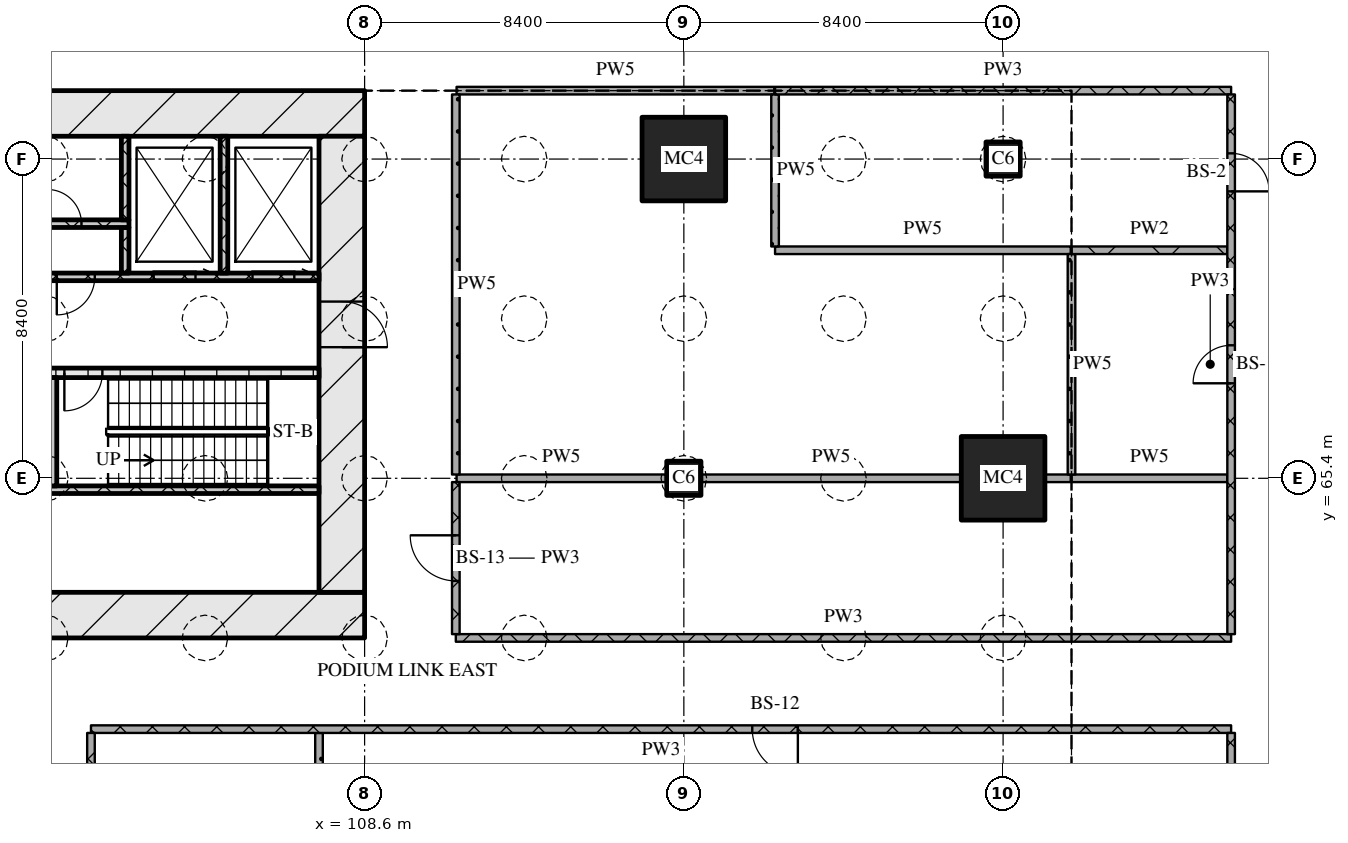
"""IFC4 building model, lengths in metres.
Left out: names, types, materials, properties, quantities, classifications, styles, units other than length and angle.
Written with IfcOpenShell. Run it as: python <this file> out.ifc"""

import sys

from ifc_helpers import new_model, si_unit, direction, frame, frame_2d, origin, origin_2d, place, context, subcontext, project, spatial, rectangle, extrude, element, fill, save


model = new_model("IFC4")
c1 = context("Model", 3, precision=1e-05, world=origin(), true_north=direction((0.0, 1.0)))
c2 = subcontext(c1, "Body", "Model", "MODEL_VIEW")
j1 = project(units=[si_unit("LENGTHUNIT", "METRE"), si_unit("PLANEANGLEUNIT", "RADIAN")], contexts=[c1])
p1 = place(None, origin())
s1 = spatial("IfcSite", under=j1, at=p1, CompositionType="ELEMENT")
p2 = place(p1, origin())
s2 = spatial("IfcBuilding", under=s1, at=p2, CompositionType="ELEMENT")
p3 = place(p2, frame((0.0, 0.0, -6.0)))
s3 = spatial("IfcBuildingStorey", under=s2, at=p3, CompositionType="ELEMENT", Elevation=-6.0)
p4 = place(p3, frame((117.0, 65.4, 0.0), z_axis=(0.0, 0.0, 1.0), x_axis=(1.0, 0.0, 0.0)))
e1 = element("IfcColumn", 1, at=p4, inside=s3, PredefinedType="COLUMN", context=c2, shape_type="SweptSolid", body=[
    extrude(rectangle(XDim=0.9, YDim=0.9, at=origin_2d()), origin(), (0.0, 0.0, 1.0), 6.0),
])
for number, where, z_axis, x_axis in (
    (2, (117.0, 73.8, 0.0), (0.0, 0.0, 1.0), (1.0, 0.0, 0.0)),
    (3, (125.4, 65.4, 0.0), (0.0, 0.0, 1.0), (1.0, 0.0, 0.0)),
):
    element("IfcColumn", number, at=place(p3, frame(where, z_axis=z_axis, x_axis=x_axis)), inside=s3, PredefinedType="COLUMN", context=c2, shape_type="SweptSolid", body=[
        extrude(rectangle(XDim=2.2, YDim=2.2, at=origin_2d()), origin(), (0.0, 0.0, 1.0), 6.0),
    ])
p5 = place(p3, frame((125.4, 73.8, 0.0), z_axis=(0.0, 0.0, 1.0), x_axis=(1.0, 0.0, 0.0)))
e4 = element("IfcColumn", 4, at=p5, inside=s3, PredefinedType="COLUMN", context=c2, shape_type="SweptSolid", body=[
    extrude(rectangle(XDim=0.9, YDim=0.9, at=origin_2d()), origin(), (0.0, 0.0, 1.0), 6.0),
])
p6 = place(p3, frame((66.6, 61.8, 0.0), z_axis=(0.0, 0.0, 1.0), x_axis=(1.0, 0.0, 0.0)))
e5 = element("IfcWall", 5, at=p6, inside=s3, PredefinedType="SOLIDWALL", context=c2, shape_type="SweptSolid", body=[
    extrude(rectangle(XDim=42.0, YDim=1.2, at=frame_2d((21.0, 0.0))), origin(), (0.0, 0.0, 1.0), 5.7),
])
p7 = place(p6, frame((21.35, 0.0, 0.0)))
e6 = element("IfcOpeningElement", 6, at=p7, cuts=e5, PredefinedType="OPENING", context=c2, shape_type="SweptSolid", body=[
    extrude(rectangle(XDim=1.8, YDim=2.1, at=frame_2d((0.9, 1.05))), frame((0.0, 0.61, 0.0), z_axis=(0.0, -1.0, 0.0), x_axis=(1.0, 0.0, 0.0)), (0.0, 0.0, 1.0), 1.22),
])
p8 = place(p3, frame((66.6, 75.0, 0.0), z_axis=(0.0, 0.0, 1.0), x_axis=(1.0, 0.0, 0.0)))
e7 = element("IfcWall", 7, at=p8, inside=s3, PredefinedType="SOLIDWALL", context=c2, shape_type="SweptSolid", body=[
    extrude(rectangle(XDim=42.0, YDim=1.2, at=frame_2d((21.0, 0.0))), origin(), (0.0, 0.0, 1.0), 5.7),
])
p9 = place(p3, frame((108.0, 62.4, 0.0), z_axis=(0.0, 0.0, 1.0), x_axis=(0.0, 1.0, 0.0)))
e8 = element("IfcWall", 8, at=p9, inside=s3, PredefinedType="SOLIDWALL", context=c2, shape_type="SweptSolid", body=[
    extrude(rectangle(XDim=12.0, YDim=1.2, at=frame_2d((6.0, 0.0))), origin(), (0.0, 0.0, 1.0), 5.7),
])
p10 = place(p9, frame((6.45, 0.0, 0.0)))
e9 = element("IfcOpeningElement", 9, at=p10, cuts=e8, PredefinedType="OPENING", context=c2, shape_type="SweptSolid", body=[
    extrude(rectangle(XDim=1.2, YDim=2.1, at=frame_2d((0.6, 1.05))), frame((0.0, 0.61, 0.0), z_axis=(0.0, -1.0, 0.0), x_axis=(1.0, 0.0, 0.0)), (0.0, 0.0, 1.0), 1.22),
])
p11 = place(p3, frame((91.4, 65.1, 0.0), z_axis=(0.0, 0.0, 1.0), x_axis=(1.0, 0.0, 0.0)))
e10 = element("IfcWall", 10, at=p11, inside=s3, PredefinedType="SOLIDWALL", context=c2, shape_type="SweptSolid", body=[
    extrude(rectangle(XDim=16.0, YDim=0.2, at=frame_2d((8.0, 0.0))), origin(), (0.0, 0.0, 1.0), 5.7),
])
p12 = place(p11, frame((7.83, 0.0, 0.0)))
e11 = element("IfcOpeningElement", 11, at=p12, cuts=e10, PredefinedType="OPENING", context=c2, shape_type="SweptSolid", body=[
    extrude(rectangle(XDim=0.9, YDim=2.1, at=frame_2d((0.45, 1.05))), frame((0.0, 0.11, 0.0), z_axis=(0.0, -1.0, 0.0), x_axis=(1.0, 0.0, 0.0)), (0.0, 0.0, 1.0), 0.22),
])
p13 = place(p3, frame((100.35, 65.2, 0.0), z_axis=(0.0, 0.0, 1.0), x_axis=(0.0, 1.0, 0.0)))
e12 = element("IfcWall", 12, at=p13, inside=s3, PredefinedType="SOLIDWALL", context=c2, shape_type="SweptSolid", body=[
    extrude(rectangle(XDim=2.85, YDim=0.3, at=frame_2d((1.425, 0.0))), origin(), (0.0, 0.0, 1.0), 5.7),
])
p14 = place(p3, frame((98.95, 68.175, 0.0), z_axis=(0.0, 0.0, 1.0), x_axis=(1.0, 0.0, 0.0)))
e13 = element("IfcWall", 13, at=p14, inside=s3, PredefinedType="SOLIDWALL", context=c2, shape_type="SweptSolid", body=[
    extrude(rectangle(XDim=8.45, YDim=0.25, at=frame_2d((4.225, 0.0))), origin(), (0.0, 0.0, 1.0), 5.7),
])
p15 = place(p14, frame((0.45, 0.0, 0.0)))
e14 = element("IfcOpeningElement", 14, at=p15, cuts=e13, PredefinedType="OPENING", context=c2, shape_type="SweptSolid", body=[
    extrude(rectangle(XDim=0.8, YDim=2.1, at=frame_2d((0.4, 1.05))), frame((0.0, 0.135, 0.0), z_axis=(0.0, -1.0, 0.0), x_axis=(1.0, 0.0, 0.0)), (0.0, 0.0, 1.0), 0.27),
])
p16 = place(p14, frame((1.75, 0.0, 0.0)))
e15 = element("IfcOpeningElement", 15, at=p16, cuts=e13, PredefinedType="OPENING", context=c2, shape_type="SweptSolid", body=[
    extrude(rectangle(XDim=1.0, YDim=2.1, at=frame_2d((0.5, 1.05))), frame((0.0, 0.135, 0.0), z_axis=(0.0, -1.0, 0.0), x_axis=(1.0, 0.0, 0.0)), (0.0, 0.0, 1.0), 0.27),
])
p17 = place(p3, frame((67.8, 70.7, 0.0), z_axis=(0.0, 0.0, 1.0), x_axis=(1.0, 0.0, 0.0)))
e16 = element("IfcWall", 16, at=p17, inside=s3, PredefinedType="SOLIDWALL", context=c2, shape_type="SweptSolid", body=[
    extrude(rectangle(XDim=39.6, YDim=0.2, at=frame_2d((19.8, 0.0))), origin(), (0.0, 0.0, 1.0), 5.7),
])
p18 = place(p17, frame((0.65, 0.0, 0.0)))
e17 = element("IfcOpeningElement", 17, at=p18, cuts=e16, PredefinedType="OPENING", context=c2, shape_type="SweptSolid", body=[
    extrude(rectangle(XDim=1.1, YDim=2.1, at=frame_2d((0.55, 1.05))), frame((0.0, 0.11, 0.0), z_axis=(0.0, -1.0, 0.0), x_axis=(1.0, 0.0, 0.0)), (0.0, 0.0, 1.0), 0.22),
])
p19 = place(p17, frame((3.25, 0.0, 0.0)))
e18 = element("IfcOpeningElement", 18, at=p19, cuts=e16, PredefinedType="OPENING", context=c2, shape_type="SweptSolid", body=[
    extrude(rectangle(XDim=1.1, YDim=2.1, at=frame_2d((0.55, 1.05))), frame((0.0, 0.11, 0.0), z_axis=(0.0, -1.0, 0.0), x_axis=(1.0, 0.0, 0.0)), (0.0, 0.0, 1.0), 0.22),
])
p20 = place(p17, frame((5.9, 0.0, 0.0)))
e19 = element("IfcOpeningElement", 19, at=p20, cuts=e16, PredefinedType="OPENING", context=c2, shape_type="SweptSolid", body=[
    extrude(rectangle(XDim=1.0, YDim=2.1, at=frame_2d((0.5, 1.05))), frame((0.0, 0.11, 0.0), z_axis=(0.0, -1.0, 0.0), x_axis=(1.0, 0.0, 0.0)), (0.0, 0.0, 1.0), 0.22),
])
p21 = place(p17, frame((21.7, 0.0, 0.0)))
e20 = element("IfcOpeningElement", 20, at=p21, cuts=e16, PredefinedType="OPENING", context=c2, shape_type="SweptSolid", body=[
    extrude(rectangle(XDim=1.0, YDim=2.1, at=frame_2d((0.5, 1.05))), frame((0.0, 0.11, 0.0), z_axis=(0.0, -1.0, 0.0), x_axis=(1.0, 0.0, 0.0)), (0.0, 0.0, 1.0), 0.22),
])
p22 = place(p17, frame((32.7, 0.0, 0.0)))
e21 = element("IfcOpeningElement", 21, at=p22, cuts=e16, PredefinedType="OPENING", context=c2, shape_type="SweptSolid", body=[
    extrude(rectangle(XDim=1.0, YDim=2.1, at=frame_2d((0.5, 1.05))), frame((0.0, 0.11, 0.0), z_axis=(0.0, -1.0, 0.0), x_axis=(1.0, 0.0, 0.0)), (0.0, 0.0, 1.0), 0.22),
])
p23 = place(p17, frame((35.25, 0.0, 0.0)))
e22 = element("IfcOpeningElement", 22, at=p23, cuts=e16, PredefinedType="OPENING", context=c2, shape_type="SweptSolid", body=[
    extrude(rectangle(XDim=1.1, YDim=2.1, at=frame_2d((0.55, 1.05))), frame((0.0, 0.11, 0.0), z_axis=(0.0, -1.0, 0.0), x_axis=(1.0, 0.0, 0.0)), (0.0, 0.0, 1.0), 0.22),
])
p24 = place(p17, frame((37.85, 0.0, 0.0)))
e23 = element("IfcOpeningElement", 23, at=p24, cuts=e16, PredefinedType="OPENING", context=c2, shape_type="SweptSolid", body=[
    extrude(rectangle(XDim=1.1, YDim=2.1, at=frame_2d((0.55, 1.05))), frame((0.0, 0.11, 0.0), z_axis=(0.0, -1.0, 0.0), x_axis=(1.0, 0.0, 0.0)), (0.0, 0.0, 1.0), 0.22),
])
p25 = place(p3, frame((102.3, 70.8, 0.0), z_axis=(0.0, 0.0, 1.0), x_axis=(0.0, 1.0, 0.0)))
e24 = element("IfcWall", 24, at=p25, inside=s3, PredefinedType="SOLIDWALL", context=c2, shape_type="SweptSolid", body=[
    extrude(rectangle(XDim=1.2, YDim=0.2, at=frame_2d((0.6, 0.0))), origin(), (0.0, 0.0, 1.0), 5.7),
])
p26 = place(p3, frame((104.9, 70.8, 0.0), z_axis=(0.0, 0.0, 1.0), x_axis=(0.0, 1.0, 0.0)))
e25 = element("IfcWall", 25, at=p26, inside=s3, PredefinedType="SOLIDWALL", context=c2, shape_type="SweptSolid", body=[
    extrude(rectangle(XDim=3.6, YDim=0.2, at=frame_2d((1.8, 0.0))), origin(), (0.0, 0.0, 1.0), 5.7),
])
p27 = place(p3, frame((90.7, 72.1, 0.0), z_axis=(0.0, 0.0, 1.0), x_axis=(1.0, 0.0, 0.0)))
e26 = element("IfcWall", 26, at=p27, inside=s3, PredefinedType="SOLIDWALL", context=c2, shape_type="SweptSolid", body=[
    extrude(rectangle(XDim=11.7, YDim=0.2, at=frame_2d((5.85, 0.0))), origin(), (0.0, 0.0, 1.0), 5.7),
])
p28 = place(p27, frame((4.175, 0.0, 0.0)))
e27 = element("IfcOpeningElement", 27, at=p28, cuts=e26, PredefinedType="OPENING", context=c2, shape_type="SweptSolid", body=[
    extrude(rectangle(XDim=0.9, YDim=2.1, at=frame_2d((0.45, 1.05))), frame((0.0, 0.11, 0.0), z_axis=(0.0, -1.0, 0.0), x_axis=(1.0, 0.0, 0.0)), (0.0, 0.0, 1.0), 0.22),
])
p29 = place(p27, frame((9.55, 0.0, 0.0)))
e28 = element("IfcOpeningElement", 28, at=p29, cuts=e26, PredefinedType="OPENING", context=c2, shape_type="SweptSolid", body=[
    extrude(rectangle(XDim=0.9, YDim=2.1, at=frame_2d((0.45, 1.05))), frame((0.0, 0.11, 0.0), z_axis=(0.0, -1.0, 0.0), x_axis=(1.0, 0.0, 0.0)), (0.0, 0.0, 1.0), 0.22),
])
p30 = place(p3, frame((102.3, 72.2, 0.0), z_axis=(0.0, 0.0, 1.0), x_axis=(0.0, 1.0, 0.0)))
e29 = element("IfcWall", 29, at=p30, inside=s3, PredefinedType="SOLIDWALL", context=c2, shape_type="SweptSolid", body=[
    extrude(rectangle(XDim=2.2, YDim=0.2, at=frame_2d((1.1, 0.0))), origin(), (0.0, 0.0, 1.0), 5.7),
])
p31 = place(p3, frame((131.4, 58.8, 0.0), z_axis=(0.0, 0.0, 1.0), x_axis=(-1.0, 0.0, 0.0)))
e30 = element("IfcWall", 30, at=p31, inside=s3, PredefinedType="PARTITIONING", context=c2, shape_type="SweptSolid", body=[
    extrude(rectangle(XDim=30.0, YDim=0.2, at=frame_2d((15.0, 0.0))), origin(), (0.0, 0.0, 1.0), 5.7),
])
p32 = place(p31, frame((11.4, 0.0, 0.0)))
e31 = element("IfcOpeningElement", 31, at=p32, cuts=e30, PredefinedType="OPENING", context=c2, shape_type="SweptSolid", body=[
    extrude(rectangle(XDim=1.2, YDim=2.1, at=frame_2d((0.6, 1.05))), frame((0.0, 0.11, 0.0), z_axis=(0.0, -1.0, 0.0), x_axis=(1.0, 0.0, 0.0)), (0.0, 0.0, 1.0), 0.22),
])
p33 = place(p3, frame((111.0, 61.2, 0.0), z_axis=(0.0, 0.0, 1.0), x_axis=(1.0, 0.0, 0.0)))
e32 = element("IfcWall", 32, at=p33, inside=s3, PredefinedType="PARTITIONING", context=c2, shape_type="SweptSolid", body=[
    extrude(rectangle(XDim=20.4, YDim=0.2, at=frame_2d((10.2, 0.0))), origin(), (0.0, 0.0, 1.0), 5.7),
])
p34 = place(p3, frame((111.02, 65.4, 0.0), z_axis=(0.0, 0.0, 1.0), x_axis=(1.0, 0.0, 0.0)))
e33 = element("IfcWall", 33, at=p34, inside=s3, PredefinedType="PARTITIONING", context=c2, shape_type="SweptSolid", body=[
    extrude(rectangle(XDim=5.51, YDim=0.2, at=frame_2d((2.755, 0.0))), origin(), (0.0, 0.0, 1.0), 5.1),
])
p35 = place(p3, frame((117.47, 65.4, 0.0), z_axis=(0.0, 0.0, 1.0), x_axis=(1.0, 0.0, 0.0)))
e34 = element("IfcWall", 34, at=p35, inside=s3, PredefinedType="PARTITIONING", context=c2, shape_type="SweptSolid", body=[
    extrude(rectangle(XDim=6.81, YDim=0.2, at=frame_2d((3.405, 0.0))), origin(), (0.0, 0.0, 1.0), 5.7),
])
p36 = place(p3, frame((126.52, 65.4, 0.0), z_axis=(0.0, 0.0, 1.0), x_axis=(1.0, 0.0, 0.0)))
e35 = element("IfcWall", 35, at=p36, inside=s3, PredefinedType="PARTITIONING", context=c2, shape_type="SweptSolid", body=[
    extrude(rectangle(XDim=0.66, YDim=0.2, at=frame_2d((0.33, 0.0))), origin(), (0.0, 0.0, 1.0), 4.71),
])
p37 = place(p3, frame((127.2, 65.4, 0.0), z_axis=(0.0, 0.0, 1.0), x_axis=(1.0, 0.0, 0.0)))
e36 = element("IfcWall", 36, at=p37, inside=s3, PredefinedType="PARTITIONING", context=c2, shape_type="SweptSolid", body=[
    extrude(rectangle(XDim=4.1, YDim=0.2, at=frame_2d((2.05, 0.0))), origin(), (0.0, 0.0, 1.0), 4.71),
])
p38 = place(p3, frame((127.2, 71.4, 0.0), z_axis=(0.0, 0.0, 1.0), x_axis=(1.0, 0.0, 0.0)))
e37 = element("IfcWall", 37, at=p38, inside=s3, PredefinedType="PARTITIONING", context=c2, shape_type="SweptSolid", body=[
    extrude(rectangle(XDim=4.1, YDim=0.2, at=frame_2d((2.05, 0.0))), origin(), (0.0, 0.0, 1.0), 5.7),
])
p39 = place(p3, frame((119.4, 71.4, 0.0), z_axis=(0.0, 0.0, 1.0), x_axis=(1.0, 0.0, 0.0)))
e38 = element("IfcWall", 38, at=p39, inside=s3, PredefinedType="PARTITIONING", context=c2, shape_type="SweptSolid", body=[
    extrude(rectangle(XDim=7.78, YDim=0.2, at=frame_2d((3.89, 0.0))), origin(), (0.0, 0.0, 1.0), 5.7),
])
p40 = place(p3, frame((119.4, 75.6, 0.0), z_axis=(0.0, 0.0, 1.0), x_axis=(1.0, 0.0, 0.0)))
e39 = element("IfcWall", 39, at=p40, inside=s3, PredefinedType="PARTITIONING", context=c2, shape_type="SweptSolid", body=[
    extrude(rectangle(XDim=12.0, YDim=0.2, at=frame_2d((6.0, 0.0))), origin(), (0.0, 0.0, 1.0), 5.7),
])
p41 = place(p3, frame((111.02, 75.6, 0.0), z_axis=(0.0, 0.0, 1.0), x_axis=(1.0, 0.0, 0.0)))
e40 = element("IfcWall", 40, at=p41, inside=s3, PredefinedType="PARTITIONING", context=c2, shape_type="SweptSolid", body=[
    extrude(rectangle(XDim=8.36, YDim=0.2, at=frame_2d((4.18, 0.0))), origin(), (0.0, 0.0, 1.0), 5.7),
])
p42 = place(p3, frame((101.4, 58.7, 0.0), z_axis=(0.0, 0.0, 1.0), x_axis=(0.0, -1.0, 0.0)))
e41 = element("IfcWall", 41, at=p42, inside=s3, PredefinedType="PARTITIONING", context=c2, shape_type="SweptSolid", body=[
    extrude(rectangle(XDim=8.0, YDim=0.2, at=frame_2d((4.0, 0.0))), origin(), (0.0, 0.0, 1.0), 5.7),
])
p43 = place(p42, frame((3.5, 0.0, 0.0)))
e42 = element("IfcOpeningElement", 42, at=p43, cuts=e41, PredefinedType="OPENING", context=c2, shape_type="SweptSolid", body=[
    extrude(rectangle(XDim=1.0, YDim=2.1, at=frame_2d((0.5, 1.05))), frame((0.0, 0.11, 0.0), z_axis=(0.0, -1.0, 0.0), x_axis=(1.0, 0.0, 0.0)), (0.0, 0.0, 1.0), 0.22),
])
p44 = place(p3, frame((107.4, 58.7, 0.0), z_axis=(0.0, 0.0, 1.0), x_axis=(0.0, -1.0, 0.0)))
e43 = element("IfcWall", 43, at=p44, inside=s3, PredefinedType="PARTITIONING", context=c2, shape_type="SweptSolid", body=[
    extrude(rectangle(XDim=7.9, YDim=0.2, at=frame_2d((3.95, 0.0))), origin(), (0.0, 0.0, 1.0), 5.7),
])
p45 = place(p3, frame((111.0, 65.3, 0.0), z_axis=(0.0, 0.0, 1.0), x_axis=(0.0, -1.0, 0.0)))
e44 = element("IfcWall", 44, at=p45, inside=s3, PredefinedType="PARTITIONING", context=c2, shape_type="SweptSolid", body=[
    extrude(rectangle(XDim=4.0, YDim=0.2, at=frame_2d((2.0, 0.0))), origin(), (0.0, 0.0, 1.0), 5.7),
])
p46 = place(p45, frame((1.4, 0.0, 0.0)))
e45 = element("IfcOpeningElement", 45, at=p46, cuts=e44, PredefinedType="OPENING", context=c2, shape_type="SweptSolid", body=[
    extrude(rectangle(XDim=1.2, YDim=2.1, at=frame_2d((0.6, 1.05))), frame((0.0, 0.11, 0.0), z_axis=(0.0, -1.0, 0.0), x_axis=(1.0, 0.0, 0.0)), (0.0, 0.0, 1.0), 0.22),
])
p47 = place(p3, frame((111.0, 75.5, 0.0), z_axis=(0.0, 0.0, 1.0), x_axis=(0.0, -1.0, 0.0)))
e46 = element("IfcWall", 46, at=p47, inside=s3, PredefinedType="PARTITIONING", context=c2, shape_type="SweptSolid", body=[
    extrude(rectangle(XDim=10.0, YDim=0.2, at=frame_2d((5.0, 0.0))), origin(), (0.0, 0.0, 1.0), 5.7),
])
p48 = place(p3, frame((119.4, 75.5, 0.0), z_axis=(0.0, 0.0, 1.0), x_axis=(0.0, -1.0, 0.0)))
e47 = element("IfcWall", 47, at=p48, inside=s3, PredefinedType="PARTITIONING", context=c2, shape_type="SweptSolid", body=[
    extrude(rectangle(XDim=4.0, YDim=0.2, at=frame_2d((2.0, 0.0))), origin(), (0.0, 0.0, 1.0), 5.7),
])
p49 = place(p3, frame((127.2, 71.3, 0.0), z_axis=(0.0, 0.0, 1.0), x_axis=(0.0, -1.0, 0.0)))
e48 = element("IfcWall", 48, at=p49, inside=s3, PredefinedType="PARTITIONING", context=c2, shape_type="SweptSolid", body=[
    extrude(rectangle(XDim=5.8, YDim=0.2, at=frame_2d((2.9, 0.0))), origin(), (0.0, 0.0, 1.0), 5.7),
])
p50 = place(p3, frame((131.4, 58.7, 0.0), z_axis=(0.0, 0.0, 1.0), x_axis=(0.0, -1.0, 0.0)))
e49 = element("IfcWall", 49, at=p50, inside=s3, PredefinedType="PARTITIONING", context=c2, shape_type="SweptSolid", body=[
    extrude(rectangle(XDim=24.4, YDim=0.2, at=frame_2d((12.2, 0.0))), origin(), (0.0, 0.0, 1.0), 5.2),
])
p51 = place(p3, frame((131.4, 61.3, 0.0), z_axis=(0.0, 0.0, 1.0), x_axis=(0.0, 1.0, 0.0)))
e50 = element("IfcWall", 50, at=p51, inside=s3, PredefinedType="PARTITIONING", context=c2, shape_type="SweptSolid", body=[
    extrude(rectangle(XDim=14.2, YDim=0.2, at=frame_2d((7.1, 0.0))), origin(), (0.0, 0.0, 1.0), 4.8),
])
p52 = place(p51, frame((6.6, 0.0, 0.0)))
e51 = element("IfcOpeningElement", 51, at=p52, cuts=e50, PredefinedType="OPENING", context=c2, shape_type="SweptSolid", body=[
    extrude(rectangle(XDim=1.0, YDim=2.1, at=frame_2d((0.5, 1.05))), frame((0.0, 0.11, 0.0), z_axis=(0.0, -1.0, 0.0), x_axis=(1.0, 0.0, 0.0)), (0.0, 0.0, 1.0), 0.22),
])
p53 = place(p51, frame((11.65, 0.0, 0.0)))
e52 = element("IfcOpeningElement", 52, at=p53, cuts=e50, PredefinedType="OPENING", context=c2, shape_type="SweptSolid", body=[
    extrude(rectangle(XDim=1.0, YDim=2.1, at=frame_2d((0.5, 1.05))), frame((0.0, 0.11, 0.0), z_axis=(0.0, -1.0, 0.0), x_axis=(1.0, 0.0, 0.0)), (0.0, 0.0, 1.0), 0.22),
])
p54 = place(p16, origin())
e53 = element("IfcDoor", 53, at=p54, inside=s3, OperationType="SINGLE_SWING_RIGHT", PredefinedType="DOOR", context=c2, shape_type="SweptSolid", body=[
    extrude(rectangle(XDim=1.0, YDim=2.1, at=frame_2d((0.5, 1.05))), frame((0.0, 0.025, 0.0), z_axis=(0.0, -1.0, 0.0), x_axis=(1.0, 0.0, 0.0)), (0.0, 0.0, 1.0), 0.05),
])
fill(e15, e53)
p55 = place(p10, origin())
e54 = element("IfcDoor", 54, at=p55, inside=s3, OperationType="SINGLE_SWING_RIGHT", PredefinedType="DOOR", context=c2, shape_type="SweptSolid", body=[
    extrude(rectangle(XDim=1.2, YDim=2.1, at=frame_2d((0.6, 1.05))), frame((0.0, 0.025, 0.0), z_axis=(0.0, -1.0, 0.0), x_axis=(1.0, 0.0, 0.0)), (0.0, 0.0, 1.0), 0.05),
])
fill(e9, e54)
p56 = place(p22, origin())
e55 = element("IfcDoor", 55, at=p56, inside=s3, OperationType="SINGLE_SWING_RIGHT", PredefinedType="DOOR", context=c2, shape_type="SweptSolid", body=[
    extrude(rectangle(XDim=1.0, YDim=2.1, at=frame_2d((0.5, 1.05))), frame((0.0, 0.025, 0.0), z_axis=(0.0, -1.0, 0.0), x_axis=(1.0, 0.0, 0.0)), (0.0, 0.0, 1.0), 0.05),
])
fill(e21, e55)
p57 = place(p23, origin())
e56 = element("IfcDoor", 56, at=p57, inside=s3, OperationType="SLIDING_TO_RIGHT", PredefinedType="DOOR", context=c2, shape_type="SweptSolid", body=[
    extrude(rectangle(XDim=1.1, YDim=2.1, at=frame_2d((0.55, 1.05))), frame((0.0, 0.025, 0.0), z_axis=(0.0, -1.0, 0.0), x_axis=(1.0, 0.0, 0.0)), (0.0, 0.0, 1.0), 0.05),
])
fill(e22, e56)
p58 = place(p24, origin())
e57 = element("IfcDoor", 57, at=p58, inside=s3, OperationType="SLIDING_TO_RIGHT", PredefinedType="DOOR", context=c2, shape_type="SweptSolid", body=[
    extrude(rectangle(XDim=1.1, YDim=2.1, at=frame_2d((0.55, 1.05))), frame((0.0, 0.025, 0.0), z_axis=(0.0, -1.0, 0.0), x_axis=(1.0, 0.0, 0.0)), (0.0, 0.0, 1.0), 0.05),
])
fill(e23, e57)
p59 = place(p29, origin())
e58 = element("IfcDoor", 58, at=p59, inside=s3, OperationType="SINGLE_SWING_LEFT", PredefinedType="DOOR", context=c2, shape_type="SweptSolid", body=[
    extrude(rectangle(XDim=0.9, YDim=2.1, at=frame_2d((0.45, 1.05))), frame((0.0, 0.025, 0.0), z_axis=(0.0, -1.0, 0.0), x_axis=(1.0, 0.0, 0.0)), (0.0, 0.0, 1.0), 0.05),
])
fill(e28, e58)
p60 = place(p32, origin())
e59 = element("IfcDoor", 59, at=p60, inside=s3, OperationType="SINGLE_SWING_LEFT", PredefinedType="DOOR", context=c2, shape_type="SweptSolid", body=[
    extrude(rectangle(XDim=1.2, YDim=2.1, at=frame_2d((0.6, 1.05))), frame((0.0, 0.025, 0.0), z_axis=(0.0, -1.0, 0.0), x_axis=(1.0, 0.0, 0.0)), (0.0, 0.0, 1.0), 0.05),
])
fill(e31, e59)
p61 = place(p46, origin())
e60 = element("IfcDoor", 60, at=p61, inside=s3, OperationType="SINGLE_SWING_RIGHT", PredefinedType="DOOR", context=c2, shape_type="SweptSolid", body=[
    extrude(rectangle(XDim=1.2, YDim=2.1, at=frame_2d((0.6, 1.05))), frame((0.0, 0.025, 0.0), z_axis=(0.0, -1.0, 0.0), x_axis=(1.0, 0.0, 0.0)), (0.0, 0.0, 1.0), 0.05),
])
fill(e45, e60)
p62 = place(p52, origin())
e61 = element("IfcDoor", 61, at=p62, inside=s3, OperationType="SINGLE_SWING_LEFT", PredefinedType="DOOR", context=c2, shape_type="SweptSolid", body=[
    extrude(rectangle(XDim=1.0, YDim=2.1, at=frame_2d((0.5, 1.05))), frame((0.0, 0.025, 0.0), z_axis=(0.0, -1.0, 0.0), x_axis=(1.0, 0.0, 0.0)), (0.0, 0.0, 1.0), 0.05),
])
fill(e51, e61)
p63 = place(p53, origin())
e62 = element("IfcDoor", 62, at=p63, inside=s3, OperationType="SINGLE_SWING_RIGHT", PredefinedType="DOOR", context=c2, shape_type="SweptSolid", body=[
    extrude(rectangle(XDim=1.0, YDim=2.1, at=frame_2d((0.5, 1.05))), frame((0.0, 0.025, 0.0), z_axis=(0.0, -1.0, 0.0), x_axis=(1.0, 0.0, 0.0)), (0.0, 0.0, 1.0), 0.05),
])
fill(e52, e62)
save(model, sys.argv[1])
